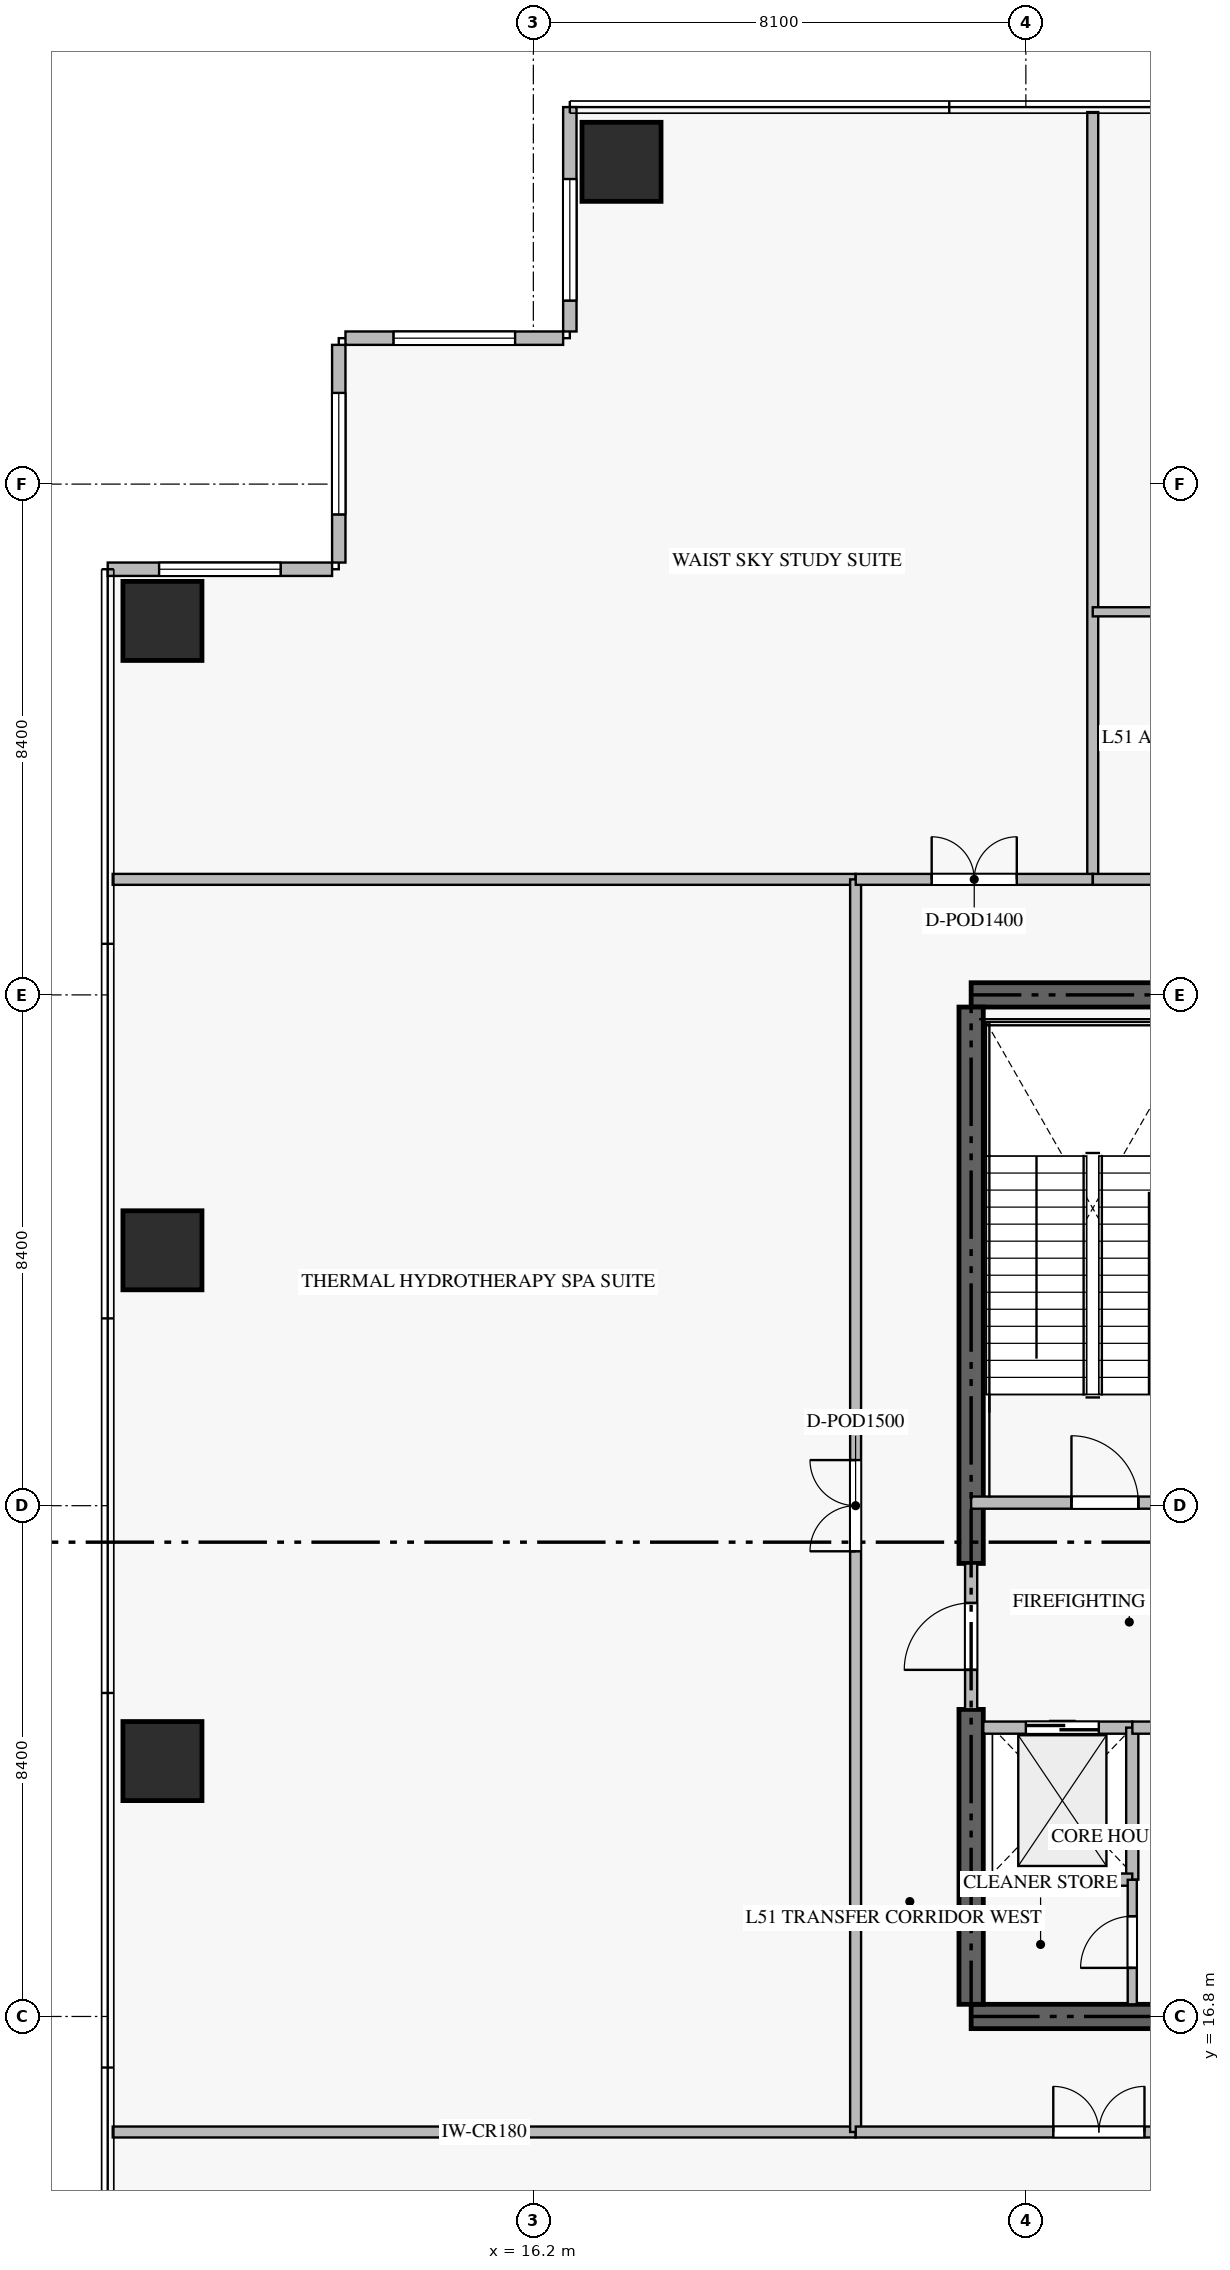
"""IFC4 building model, lengths in metres.
Left out: names, types, materials, properties, quantities, classifications, styles, units other than length and angle.
Written with IfcOpenShell. Run it as: python <this file> out.ifc"""

import sys

from ifc_helpers import new_model, si_unit, direction, frame, frame_2d, origin, origin_2d, place, context, subcontext, project, spatial, rectangle, extrude, source, transform, mapped, element, fill, save


model = new_model("IFC4")
c1 = context("Model", 3, precision=1e-05, world=origin(), true_north=direction((0.0, 1.0)))
c2 = subcontext(c1, "Body", "Model", "MODEL_VIEW")
j1 = project(units=[si_unit("LENGTHUNIT", "METRE"), si_unit("PLANEANGLEUNIT", "RADIAN")], contexts=[c1])
p1 = place(None, origin())
s1 = spatial("IfcSite", under=j1, at=p1, CompositionType="ELEMENT")
p2 = place(p1, origin())
s2 = spatial("IfcBuilding", under=s1, at=p2, CompositionType="ELEMENT")
p3 = place(p2, frame((0.0, 0.0, 204.9)))
s3 = spatial("IfcBuildingStorey", under=s2, at=p3, CompositionType="ELEMENT", Elevation=204.9)
for number, where, z_axis, x_axis in (
    (1, (23.4, 16.8, -0.36), (0.0, 0.0, 1.0), (1.0, 0.0, 0.0)),
    (2, (41.4, 33.6, -0.36), (0.0, 0.0, 1.0), (-1.0, 0.0, 0.0)),
):
    element("IfcWall", number, at=place(p3, frame(where, z_axis=z_axis, x_axis=x_axis)), inside=s3, PredefinedType="SHEAR", context=c2, shape_type="SweptSolid", body=[
        extrude(rectangle(XDim=18.0, YDim=0.4, at=frame_2d((9.0, 0.0))), origin(), (0.0, 0.0, 1.0), 5.468),
    ])
p4 = place(p3, frame((23.4, 17.0, -0.36), z_axis=(0.0, 0.0, 1.0), x_axis=(0.0, 1.0, 0.0)))
e3 = element("IfcWall", 3, at=p4, inside=s3, PredefinedType="SHEAR", context=c2, shape_type="SweptSolid", body=[
    extrude(rectangle(XDim=4.85, YDim=0.4, at=frame_2d((2.425, 0.0))), origin(), (0.0, 0.0, 1.0), 5.468),
])
p5 = place(p3, frame((23.4, 24.25, -0.36), z_axis=(0.0, 0.0, 1.0), x_axis=(0.0, 1.0, 0.0)))
e4 = element("IfcWall", 4, at=p5, inside=s3, PredefinedType="SHEAR", context=c2, shape_type="SweptSolid", body=[
    extrude(rectangle(XDim=9.15, YDim=0.4, at=frame_2d((4.575, 0.0))), origin(), (0.0, 0.0, 1.0), 5.468),
])
m1 = source(origin(), c2, "Body", "SweptSolid", [
    extrude(rectangle(XDim=1.3, YDim=1.3, at=origin_2d()), origin(), (0.0, 0.0, 1.0), 5.47),
])
for number, where, z_axis, x_axis in (
    (5, (17.65, 47.3, -0.36), (0.0, 0.0, 1.0), (1.0, 0.0, 0.0)),
    (6, (10.1, 21.0, -0.36), (0.0, 0.0, 1.0), (1.0, 0.0, 0.0)),
    (7, (10.1, 29.4, -0.36), (0.0, 0.0, 1.0), (1.0, 0.0, 0.0)),
    (8, (10.1, 39.75, -0.36), (0.0, 0.0, 1.0), (1.0, 0.0, 0.0)),
):
    element("IfcColumn", number, at=place(p3, frame(where, z_axis=z_axis, x_axis=x_axis)), inside=s3, PredefinedType="COLUMN", context=c2, shape_type="MappedRepresentation", body=[
        mapped(m1, transform((0.0, 0.0, 0.0), scale=1.0)),
    ])
p6 = place(p3, frame((16.8, 48.2, 0.0), z_axis=(0.0, 0.0, 1.0), x_axis=(0.0, -1.0, 0.0)))
e9 = element("IfcWall", 9, at=p6, inside=s3, PredefinedType="ELEMENTEDWALL", context=c2, shape_type="SweptSolid", body=[
    extrude(rectangle(XDim=3.69, YDim=0.22, at=frame_2d((1.845, 0.0))), origin(), (0.0, 0.0, 1.0), 3.945),
])
p7 = place(p6, frame((1.183, 0.0, 0.65)))
e10 = element("IfcOpeningElement", 10, at=p7, cuts=e9, PredefinedType="OPENING", context=c2, shape_type="SweptSolid", body=[
    extrude(rectangle(XDim=2.0, YDim=2.2, at=frame_2d((1.0, 1.1))), frame((0.0, 0.12, 0.0), z_axis=(0.0, -1.0, 0.0), x_axis=(1.0, 0.0, 0.0)), (0.0, 0.0, 1.0), 0.24),
])
p8 = place(p3, frame((16.69, 44.4, 0.0), z_axis=(0.0, 0.0, 1.0), x_axis=(-1.0, 0.0, 0.0)))
e11 = element("IfcWall", 11, at=p8, inside=s3, PredefinedType="ELEMENTEDWALL", context=c2, shape_type="SweptSolid", body=[
    extrude(rectangle(XDim=3.58, YDim=0.22, at=frame_2d((1.79, 0.0))), origin(), (0.0, 0.0, 1.0), 5.095),
])
p9 = place(p8, frame((0.79, 0.0, 0.65)))
e12 = element("IfcOpeningElement", 12, at=p9, cuts=e11, PredefinedType="OPENING", context=c2, shape_type="SweptSolid", body=[
    extrude(rectangle(XDim=2.0, YDim=2.2, at=frame_2d((1.0, 1.1))), frame((0.0, 0.12, 0.0), z_axis=(0.0, -1.0, 0.0), x_axis=(1.0, 0.0, 0.0)), (0.0, 0.0, 1.0), 0.24),
])
p10 = place(p3, frame((13.0, 44.29, 0.0), z_axis=(0.0, 0.0, 1.0), x_axis=(0.0, -1.0, 0.0)))
e13 = element("IfcWall", 13, at=p10, inside=s3, PredefinedType="ELEMENTEDWALL", context=c2, shape_type="SweptSolid", body=[
    extrude(rectangle(XDim=3.58, YDim=0.22, at=frame_2d((1.79, 0.0))), origin(), (0.0, 0.0, 1.0), 5.095),
])
p11 = place(p10, frame((0.79, 0.0, 0.65)))
e14 = element("IfcOpeningElement", 14, at=p11, cuts=e13, PredefinedType="OPENING", context=c2, shape_type="SweptSolid", body=[
    extrude(rectangle(XDim=2.0, YDim=2.2, at=frame_2d((1.0, 1.1))), frame((0.0, 0.12, 0.0), z_axis=(0.0, -1.0, 0.0), x_axis=(1.0, 0.0, 0.0)), (0.0, 0.0, 1.0), 0.24),
])
p12 = place(p3, frame((12.89, 40.6, 0.0), z_axis=(0.0, 0.0, 1.0), x_axis=(-1.0, 0.0, 0.0)))
e15 = element("IfcWall", 15, at=p12, inside=s3, PredefinedType="ELEMENTEDWALL", context=c2, shape_type="SweptSolid", body=[
    extrude(rectangle(XDim=3.69, YDim=0.22, at=frame_2d((1.845, 0.0))), origin(), (0.0, 0.0, 1.0), 3.945),
])
p13 = place(p12, frame((0.845, 0.0, 0.65)))
e16 = element("IfcOpeningElement", 16, at=p13, cuts=e15, PredefinedType="OPENING", context=c2, shape_type="SweptSolid", body=[
    extrude(rectangle(XDim=2.0, YDim=2.2, at=frame_2d((1.0, 1.1))), frame((0.0, 0.12, 0.0), z_axis=(0.0, -1.0, 0.0), x_axis=(1.0, 0.0, 0.0)), (0.0, 0.0, 1.0), 0.24),
])
p14 = place(p3, frame((23.4, 25.25, 0.0), z_axis=(0.0, 0.0, 1.0), x_axis=(1.0, 0.0, 0.0)))
e17 = element("IfcWall", 17, at=p14, inside=s3, PredefinedType="STANDARD", context=c2, shape_type="SweptSolid", body=[
    extrude(rectangle(XDim=4.45, YDim=0.2, at=frame_2d((2.225, 0.0))), origin(), (0.0, 0.0, 1.0), 5.11),
])
p15 = place(p14, frame((1.65, 0.0, 0.0)))
e18 = element("IfcOpeningElement", 18, at=p15, cuts=e17, PredefinedType="OPENING", context=c2, shape_type="SweptSolid", body=[
    extrude(rectangle(XDim=1.1, YDim=2.15, at=frame_2d((0.55, 1.075))), frame((0.0, 0.11, 0.0), z_axis=(0.0, -1.0, 0.0), x_axis=(1.0, 0.0, 0.0)), (0.0, 0.0, 1.0), 0.22),
])
p16 = place(p3, frame((23.6, 21.55, 0.0), z_axis=(0.0, 0.0, 1.0), x_axis=(1.0, 0.0, 0.0)))
e19 = element("IfcWall", 19, at=p16, inside=s3, PredefinedType="STANDARD", context=c2, shape_type="SweptSolid", body=[
    extrude(rectangle(XDim=2.45, YDim=0.2, at=frame_2d((1.225, 0.0))), origin(), (0.0, 0.0, 1.0), 5.11),
])
p17 = place(p16, frame((0.7, 0.0, 0.0)))
e20 = element("IfcOpeningElement", 20, at=p17, cuts=e19, PredefinedType="OPENING", context=c2, shape_type="SweptSolid", body=[
    extrude(rectangle(XDim=1.2, YDim=2.2, at=frame_2d((0.6, 1.1))), frame((0.0, 0.11, 0.0), z_axis=(0.0, -1.0, 0.0), x_axis=(1.0, 0.0, 0.0)), (0.0, 0.0, 1.0), 0.22),
])
p18 = place(p3, frame((26.05, 19.05, 0.0), z_axis=(0.0, 0.0, 1.0), x_axis=(0.0, 1.0, 0.0)))
e21 = element("IfcWall", 21, at=p18, inside=s3, PredefinedType="STANDARD", context=c2, shape_type="SweptSolid", body=[
    extrude(rectangle(XDim=2.5, YDim=0.2, at=frame_2d((1.25, 0.0))), origin(), (0.0, 0.0, 1.0), 5.11),
])
p19 = place(p3, frame((23.6, 19.05, 0.0), z_axis=(0.0, 0.0, 1.0), x_axis=(1.0, 0.0, 0.0)))
e22 = element("IfcWall", 22, at=p19, inside=s3, PredefinedType="STANDARD", context=c2, shape_type="SweptSolid", body=[
    extrude(rectangle(XDim=2.45, YDim=0.2, at=frame_2d((1.225, 0.0))), origin(), (0.0, 0.0, 1.0), 5.11),
])
p20 = place(p3, frame((26.052, 21.55, 0.0), z_axis=(0.0, 0.0, 1.0), x_axis=(1.0, 0.0, 0.0)))
e23 = element("IfcWall", 23, at=p20, inside=s3, PredefinedType="STANDARD", context=c2, shape_type="SweptSolid", body=[
    extrude(rectangle(XDim=1.648, YDim=0.2, at=frame_2d((0.824, 0.0))), origin(), (0.0, 0.0, 1.0), 5.11),
])
p21 = place(p20, frame((0.399, 0.0, 0.0)))
e24 = element("IfcOpeningElement", 24, at=p21, cuts=e23, PredefinedType="OPENING", context=c2, shape_type="SweptSolid", body=[
    extrude(rectangle(XDim=0.85, YDim=2.1, at=frame_2d((0.425, 1.05))), frame((0.0, 0.11, 0.0), z_axis=(0.0, -1.0, 0.0), x_axis=(1.0, 0.0, 0.0)), (0.0, 0.0, 1.0), 0.22),
])
p22 = place(p3, frame((23.4, 21.852, 0.0), z_axis=(0.0, 0.0, 1.0), x_axis=(0.0, 1.0, 0.0)))
e25 = element("IfcWall", 25, at=p22, inside=s3, PredefinedType="STANDARD", context=c2, shape_type="SweptSolid", body=[
    extrude(rectangle(XDim=2.396, YDim=0.2, at=frame_2d((1.198, 0.0))), origin(), (0.0, 0.0, 1.0), 5.11),
])
p23 = place(p22, frame((0.648, 0.0, 0.0)))
e26 = element("IfcOpeningElement", 26, at=p23, cuts=e25, PredefinedType="OPENING", context=c2, shape_type="SweptSolid", body=[
    extrude(rectangle(XDim=1.1, YDim=2.15, at=frame_2d((0.55, 1.075))), frame((0.0, 0.11, 0.0), z_axis=(0.0, -1.0, 0.0), x_axis=(1.0, 0.0, 0.0)), (0.0, 0.0, 1.0), 0.22),
])
p24 = place(p3, frame((26.05, 17.0, 0.0), z_axis=(0.0, 0.0, 1.0), x_axis=(0.0, 1.0, 0.0)))
e27 = element("IfcWall", 27, at=p24, inside=s3, PredefinedType="PARTITIONING", context=c2, shape_type="SweptSolid", body=[
    extrude(rectangle(XDim=2.048, YDim=0.15, at=frame_2d((1.024, 0.0))), origin(), (0.0, 0.0, 1.0), 5.11),
])
p25 = place(p24, frame((0.599, 0.0, 0.0)))
e28 = element("IfcOpeningElement", 28, at=p25, cuts=e27, PredefinedType="OPENING", context=c2, shape_type="SweptSolid", body=[
    extrude(rectangle(XDim=0.85, YDim=2.1, at=frame_2d((0.425, 1.05))), frame((0.0, 0.085, 0.0), z_axis=(0.0, -1.0, 0.0), x_axis=(1.0, 0.0, 0.0)), (0.0, 0.0, 1.0), 0.17),
])
for number, where, z_axis, x_axis in (
    (29, (9.282, 14.9, 0.0), (0.0, 0.0, 1.0), (1.0, 0.0, 0.0)),
    (30, (9.282, 35.5, 0.0), (0.0, 0.0, 1.0), (1.0, 0.0, 0.0)),
):
    element("IfcWall", number, at=place(p3, frame(where, z_axis=z_axis, x_axis=x_axis)), inside=s3, PredefinedType="PARTITIONING", context=c2, shape_type="SweptSolid", body=[
        extrude(rectangle(XDim=12.218, YDim=0.18, at=frame_2d((6.109, 0.0))), origin(), (0.0, 0.0, 1.0), 5.11),
    ])
p26 = place(p3, frame((21.5, 14.9, 0.0), z_axis=(0.0, 0.0, 1.0), x_axis=(0.0, 1.0, 0.0)))
e31 = element("IfcWall", 31, at=p26, inside=s3, PredefinedType="PARTITIONING", context=c2, shape_type="SweptSolid", body=[
    extrude(rectangle(XDim=20.6, YDim=0.18, at=frame_2d((10.3, 0.0))), origin(), (0.0, 0.0, 1.0), 5.11),
])
p27 = place(p26, frame((9.55, 0.0, 0.0)))
e32 = element("IfcOpeningElement", 32, at=p27, cuts=e31, PredefinedType="OPENING", context=c2, shape_type="SweptSolid", body=[
    extrude(rectangle(XDim=1.5, YDim=2.25, at=frame_2d((0.75, 1.125))), frame((0.0, 0.1, 0.0), z_axis=(0.0, -1.0, 0.0), x_axis=(1.0, 0.0, 0.0)), (0.0, 0.0, 1.0), 0.2),
])
p28 = place(p3, frame((25.4, 35.5, 0.0), z_axis=(0.0, 0.0, 1.0), x_axis=(0.0, 1.0, 0.0)))
e33 = element("IfcWall", 33, at=p28, inside=s3, PredefinedType="PARTITIONING", context=c2, shape_type="SweptSolid", body=[
    extrude(rectangle(XDim=12.618, YDim=0.18, at=frame_2d((6.309, 0.0))), origin(), (0.0, 0.0, 1.0), 5.11),
])
p29 = place(p3, frame((21.502, 14.9, 0.0), z_axis=(0.0, 0.0, 1.0), x_axis=(1.0, 0.0, 0.0)))
e34 = element("IfcWall", 34, at=p29, inside=s3, PredefinedType="PARTITIONING", context=c2, shape_type="SweptSolid", body=[
    extrude(rectangle(XDim=7.998, YDim=0.18, at=frame_2d((3.999, 0.0))), origin(), (0.0, 0.0, 1.0), 5.11),
])
p30 = place(p29, frame((3.249, 0.0, 0.0)))
e35 = element("IfcOpeningElement", 35, at=p30, cuts=e34, PredefinedType="OPENING", context=c2, shape_type="SweptSolid", body=[
    extrude(rectangle(XDim=1.5, YDim=2.25, at=frame_2d((0.75, 1.125))), frame((0.0, 0.1, 0.0), z_axis=(0.0, -1.0, 0.0), x_axis=(1.0, 0.0, 0.0)), (0.0, 0.0, 1.0), 0.2),
])
p31 = place(p3, frame((21.502, 35.5, 0.0), z_axis=(0.0, 0.0, 1.0), x_axis=(1.0, 0.0, 0.0)))
e36 = element("IfcWall", 36, at=p31, inside=s3, PredefinedType="PARTITIONING", context=c2, shape_type="SweptSolid", body=[
    extrude(rectangle(XDim=3.898, YDim=0.18, at=frame_2d((1.949, 0.0))), origin(), (0.0, 0.0, 1.0), 5.11),
])
p32 = place(p31, frame((1.249, 0.0, 0.0)))
e37 = element("IfcOpeningElement", 37, at=p32, cuts=e36, PredefinedType="OPENING", context=c2, shape_type="SweptSolid", body=[
    extrude(rectangle(XDim=1.4, YDim=2.25, at=frame_2d((0.7, 1.125))), frame((0.0, 0.1, 0.0), z_axis=(0.0, -1.0, 0.0), x_axis=(1.0, 0.0, 0.0)), (0.0, 0.0, 1.0), 0.2),
])
p33 = place(p3, frame((25.402, 35.5, 0.0), z_axis=(0.0, 0.0, 1.0), x_axis=(1.0, 0.0, 0.0)))
e38 = element("IfcWall", 38, at=p33, inside=s3, PredefinedType="PARTITIONING", context=c2, shape_type="SweptSolid", body=[
    extrude(rectangle(XDim=4.098, YDim=0.18, at=frame_2d((2.049, 0.0))), origin(), (0.0, 0.0, 1.0), 5.11),
])
p34 = place(p33, frame((1.549, 0.0, 0.0)))
e39 = element("IfcOpeningElement", 39, at=p34, cuts=e38, PredefinedType="OPENING", context=c2, shape_type="SweptSolid", body=[
    extrude(rectangle(XDim=1.0, YDim=2.15, at=frame_2d((0.5, 1.075))), frame((0.0, 0.1, 0.0), z_axis=(0.0, -1.0, 0.0), x_axis=(1.0, 0.0, 0.0)), (0.0, 0.0, 1.0), 0.2),
])
p35 = place(p3, frame((25.4, 39.9, 0.0), z_axis=(0.0, 0.0, 1.0), x_axis=(1.0, 0.0, 0.0)))
e40 = element("IfcWall", 40, at=p35, inside=s3, PredefinedType="PARTITIONING", context=c2, shape_type="SweptSolid", body=[
    extrude(rectangle(XDim=13.1, YDim=0.15, at=frame_2d((6.55, 0.0))), origin(), (0.0, 0.0, 1.0), 3.945),
])
p36 = place(p35, frame((2.196, 0.0, 0.0)))
e41 = element("IfcOpeningElement", 41, at=p36, cuts=e40, PredefinedType="OPENING", context=c2, shape_type="SweptSolid", body=[
    extrude(rectangle(XDim=0.9, YDim=2.1, at=frame_2d((0.45, 1.05))), frame((0.0, 0.085, 0.0), z_axis=(0.0, -1.0, 0.0), x_axis=(1.0, 0.0, 0.0)), (0.0, 0.0, 1.0), 0.17),
])
m2 = source(origin(), c2, "Body", "SweptSolid", [
    extrude(rectangle(XDim=2.0, YDim=2.2, at=frame_2d((1.0, 1.1))), frame((0.0, 0.03, 0.0), z_axis=(0.0, -1.0, 0.0), x_axis=(1.0, 0.0, 0.0)), (0.0, 0.0, 1.0), 0.06),
])
p37 = place(p7, origin())
e42 = element("IfcWindow", 42, at=p37, inside=s3, PartitioningType="SINGLE_PANEL", PredefinedType="WINDOW", context=c2, shape_type="MappedRepresentation", body=[
    mapped(m2, transform((0.0, 0.0, 0.0), scale=1.0)),
])
fill(e10, e42)
p38 = place(p9, origin())
e43 = element("IfcWindow", 43, at=p38, inside=s3, PartitioningType="SINGLE_PANEL", PredefinedType="WINDOW", context=c2, shape_type="MappedRepresentation", body=[
    mapped(m2, transform((0.0, 0.0, 0.0), scale=1.0)),
])
fill(e12, e43)
p39 = place(p11, origin())
e44 = element("IfcWindow", 44, at=p39, inside=s3, PartitioningType="SINGLE_PANEL", PredefinedType="WINDOW", context=c2, shape_type="MappedRepresentation", body=[
    mapped(m2, transform((0.0, 0.0, 0.0), scale=1.0)),
])
fill(e14, e44)
p40 = place(p13, origin())
e45 = element("IfcWindow", 45, at=p40, inside=s3, PartitioningType="SINGLE_PANEL", PredefinedType="WINDOW", context=c2, shape_type="MappedRepresentation", body=[
    mapped(m2, transform((0.0, 0.0, 0.0), scale=1.0)),
])
fill(e16, e45)
m3 = source(origin(), c2, "Body", "SweptSolid", [
    extrude(rectangle(XDim=1.1, YDim=2.15, at=frame_2d((0.55, 1.075))), frame((0.0, 0.025, 0.0), z_axis=(0.0, -1.0, 0.0), x_axis=(1.0, 0.0, 0.0)), (0.0, 0.0, 1.0), 0.05),
])
p41 = place(p15, origin())
e46 = element("IfcDoor", 46, at=p41, inside=s3, OperationType="SINGLE_SWING_LEFT", PredefinedType="DOOR", context=c2, shape_type="MappedRepresentation", body=[
    mapped(m3, transform((0.0, 0.0, 0.0), scale=1.0)),
])
fill(e18, e46)
m4 = source(origin(), c2, "Body", "SweptSolid", [
    extrude(rectangle(XDim=1.2, YDim=2.2, at=frame_2d((0.6, 1.1))), frame((0.0, 0.025, 0.0), z_axis=(0.0, -1.0, 0.0), x_axis=(1.0, 0.0, 0.0)), (0.0, 0.0, 1.0), 0.05),
])
p42 = place(p17, origin())
e47 = element("IfcDoor", 47, at=p42, inside=s3, OperationType="DOUBLE_DOOR_SLIDING", PredefinedType="DOOR", context=c2, shape_type="MappedRepresentation", body=[
    mapped(m4, transform((0.0, 0.0, 0.0), scale=1.0)),
])
fill(e20, e47)
p43 = place(p23, origin())
e48 = element("IfcDoor", 48, at=p43, inside=s3, OperationType="SINGLE_SWING_LEFT", PredefinedType="DOOR", context=c2, shape_type="MappedRepresentation", body=[
    mapped(m3, transform((0.0, 0.0, 0.0), scale=1.0)),
])
fill(e26, e48)
m5 = source(origin(), c2, "Body", "SweptSolid", [
    extrude(rectangle(XDim=0.85, YDim=2.1, at=frame_2d((0.425, 1.05))), frame((0.0, 0.025, 0.0), z_axis=(0.0, -1.0, 0.0), x_axis=(1.0, 0.0, 0.0)), (0.0, 0.0, 1.0), 0.05),
])
p44 = place(p25, origin())
e49 = element("IfcDoor", 49, at=p44, inside=s3, OperationType="SINGLE_SWING_LEFT", PredefinedType="DOOR", context=c2, shape_type="MappedRepresentation", body=[
    mapped(m5, transform((0.0, 0.0, 0.0), scale=1.0)),
])
fill(e28, e49)
m6 = source(origin(), c2, "Body", "SweptSolid", [
    extrude(rectangle(XDim=1.5, YDim=2.25, at=frame_2d((0.75, 1.125))), frame((0.0, 0.025, 0.0), z_axis=(0.0, -1.0, 0.0), x_axis=(1.0, 0.0, 0.0)), (0.0, 0.0, 1.0), 0.05),
])
p45 = place(p27, origin())
e50 = element("IfcDoor", 50, at=p45, inside=s3, OperationType="DOUBLE_DOOR_SINGLE_SWING", PredefinedType="DOOR", context=c2, shape_type="MappedRepresentation", body=[
    mapped(m6, transform((0.0, 0.0, 0.0), scale=1.0)),
])
fill(e32, e50)
p46 = place(p30, origin())
e51 = element("IfcDoor", 51, at=p46, inside=s3, OperationType="DOUBLE_DOOR_SINGLE_SWING", PredefinedType="DOOR", context=c2, shape_type="MappedRepresentation", body=[
    mapped(m6, transform((0.0, 0.0, 0.0), scale=1.0)),
])
fill(e35, e51)
m7 = source(origin(), c2, "Body", "SweptSolid", [
    extrude(rectangle(XDim=1.4, YDim=2.25, at=frame_2d((0.7, 1.125))), frame((0.0, 0.025, 0.0), z_axis=(0.0, -1.0, 0.0), x_axis=(1.0, 0.0, 0.0)), (0.0, 0.0, 1.0), 0.05),
])
p47 = place(p32, origin())
e52 = element("IfcDoor", 52, at=p47, inside=s3, OperationType="DOUBLE_DOOR_SINGLE_SWING", PredefinedType="DOOR", context=c2, shape_type="MappedRepresentation", body=[
    mapped(m7, transform((0.0, 0.0, 0.0), scale=1.0)),
])
fill(e37, e52)
save(model, sys.argv[1])
